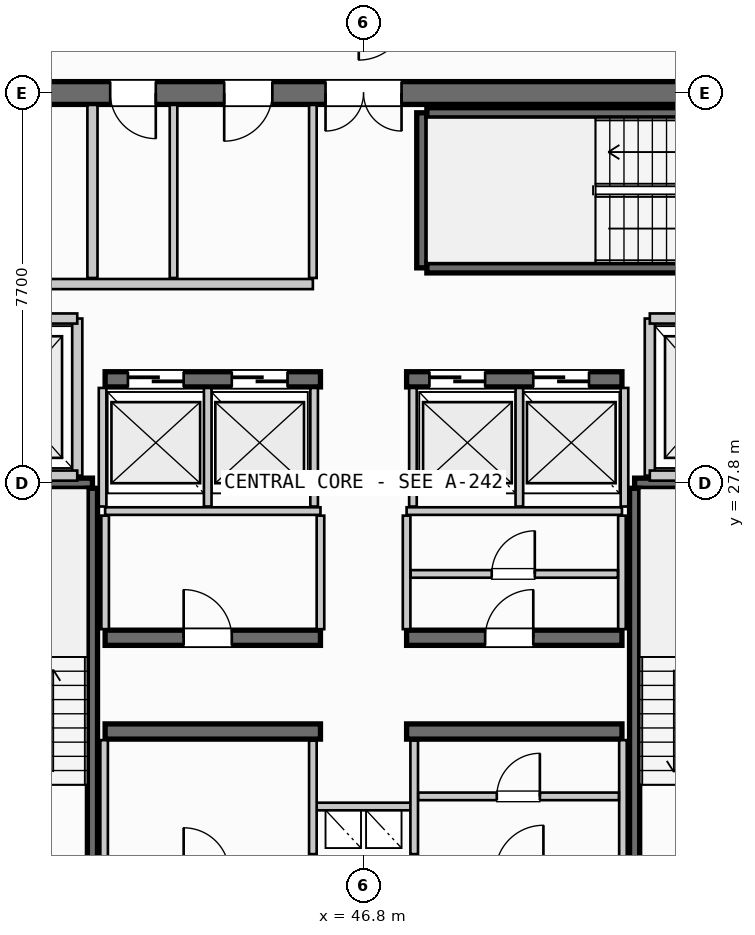
"""IFC4 building model, lengths in metres.
Left out: names, types, materials, properties, quantities, classifications, styles, units other than length and angle.
Written with IfcOpenShell. Run it as: python <this file> out.ifc"""

import sys

from ifc_helpers import new_model, si_unit, direction, frame, frame_2d, origin, place, context, subcontext, project, spatial, rectangle, extrude, source, transform, mapped, element, fill, save


model = new_model("IFC4")
c1 = context("Model", 3, precision=1e-05, world=origin(), true_north=direction((0.0, 1.0)))
c2 = subcontext(c1, "Body", "Model", "MODEL_VIEW")
j1 = project(units=[si_unit("LENGTHUNIT", "METRE"), si_unit("PLANEANGLEUNIT", "RADIAN")], contexts=[c1])
p1 = place(None, origin())
s1 = spatial("IfcSite", under=j1, at=p1, CompositionType="ELEMENT")
p2 = place(p1, origin())
s2 = spatial("IfcBuilding", under=s1, at=p2, CompositionType="ELEMENT")
p3 = place(p2, frame((0.0, 0.0, 300.85)))
s3 = spatial("IfcBuildingStorey", under=s2, at=p3, CompositionType="ELEMENT", Elevation=300.85)
p4 = place(p3, frame((55.6, 35.5, 0.0), z_axis=(0.0, 0.0, 1.0), x_axis=(-1.0, 0.0, 0.0)))
e1 = element("IfcWall", 1, at=p4, inside=s3, PredefinedType="SHEAR", context=c2, shape_type="SweptSolid", body=[
    extrude(rectangle(XDim=17.6, YDim=0.45, at=frame_2d((8.8, 0.0))), origin(), (0.0, 0.0, 1.0), 3.185),
])
p5 = place(p4, frame((8.05, 0.0, 0.0)))
e2 = element("IfcOpeningElement", 2, at=p5, cuts=e1, PredefinedType="OPENING", context=c2, shape_type="SweptSolid", body=[
    extrude(rectangle(XDim=1.5, YDim=2.2, at=frame_2d((0.75, 1.1))), frame((0.0, 0.235, 0.0), z_axis=(0.0, -1.0, 0.0), x_axis=(1.0, 0.0, 0.0)), (0.0, 0.0, 1.0), 0.47),
])
p6 = place(p4, frame((15.1, 0.0, 0.0)))
e3 = element("IfcOpeningElement", 3, at=p6, cuts=e1, PredefinedType="OPENING", context=c2, shape_type="SweptSolid", body=[
    extrude(rectangle(XDim=0.95, YDim=2.15, at=frame_2d((0.475, 1.075))), frame((0.0, 0.235, 0.0), z_axis=(0.0, -1.0, 0.0), x_axis=(1.0, 0.0, 0.0)), (0.0, 0.0, 1.0), 0.47),
])
p7 = place(p4, frame((12.9, 0.0, 0.0)))
e4 = element("IfcOpeningElement", 4, at=p7, cuts=e1, PredefinedType="OPENING", context=c2, shape_type="SweptSolid", body=[
    extrude(rectangle(XDim=0.9, YDim=2.15, at=frame_2d((0.45, 1.075))), frame((0.0, 0.235, 0.0), z_axis=(0.0, -1.0, 0.0), x_axis=(1.0, 0.0, 0.0)), (0.0, 0.0, 1.0), 0.47),
])
p8 = place(p4, frame((10.6, 0.0, 0.0)))
e5 = element("IfcOpeningElement", 5, at=p8, cuts=e1, PredefinedType="OPENING", context=c2, shape_type="SweptSolid", body=[
    extrude(rectangle(XDim=0.95, YDim=2.15, at=frame_2d((0.475, 1.075))), frame((0.0, 0.235, 0.0), z_axis=(0.0, -1.0, 0.0), x_axis=(1.0, 0.0, 0.0)), (0.0, 0.0, 1.0), 0.47),
])
for number, where, z_axis, x_axis in (
    (6, (41.7, 22.9, 0.0), (0.0, 0.0, 1.0), (1.0, 0.0, 0.0)),
    (7, (47.65, 22.9, 0.0), (0.0, 0.0, 1.0), (1.0, 0.0, 0.0)),
):
    element("IfcWall", number, at=place(p3, frame(where, z_axis=z_axis, x_axis=x_axis)), inside=s3, PredefinedType="SHEAR", context=c2, shape_type="SweptSolid", body=[
        extrude(rectangle(XDim=4.25, YDim=0.3, at=frame_2d((2.125, 0.0))), origin(), (0.0, 0.0, 1.0), 3.185),
    ])
p9 = place(p3, frame((41.7, 24.75, 0.0), z_axis=(0.0, 0.0, 1.0), x_axis=(1.0, 0.0, 0.0)))
e8 = element("IfcWall", 8, at=p9, inside=s3, PredefinedType="SHEAR", context=c2, shape_type="SweptSolid", body=[
    extrude(rectangle(XDim=4.25, YDim=0.3, at=frame_2d((2.125, 0.0))), origin(), (0.0, 0.0, 1.0), 3.185),
])
p10 = place(p9, frame((1.55, 0.0, 0.0)))
e9 = element("IfcOpeningElement", 9, at=p10, cuts=e8, PredefinedType="OPENING", context=c2, shape_type="SweptSolid", body=[
    extrude(rectangle(XDim=0.95, YDim=2.15, at=frame_2d((0.475, 1.075))), frame((0.0, 0.16, 0.0), z_axis=(0.0, -1.0, 0.0), x_axis=(1.0, 0.0, 0.0)), (0.0, 0.0, 1.0), 0.32),
])
p11 = place(p3, frame((47.65, 24.75, 0.0), z_axis=(0.0, 0.0, 1.0), x_axis=(1.0, 0.0, 0.0)))
e10 = element("IfcWall", 10, at=p11, inside=s3, PredefinedType="SHEAR", context=c2, shape_type="SweptSolid", body=[
    extrude(rectangle(XDim=4.25, YDim=0.3, at=frame_2d((2.125, 0.0))), origin(), (0.0, 0.0, 1.0), 3.185),
])
p12 = place(p11, frame((1.55, 0.0, 0.0)))
e11 = element("IfcOpeningElement", 11, at=p12, cuts=e10, PredefinedType="OPENING", context=c2, shape_type="SweptSolid", body=[
    extrude(rectangle(XDim=0.95, YDim=2.15, at=frame_2d((0.475, 1.075))), frame((0.0, 0.16, 0.0), z_axis=(0.0, -1.0, 0.0), x_axis=(1.0, 0.0, 0.0)), (0.0, 0.0, 1.0), 0.32),
])
p13 = place(p3, frame((41.7, 29.85, 0.0), z_axis=(0.0, 0.0, 1.0), x_axis=(1.0, 0.0, 0.0)))
e12 = element("IfcWall", 12, at=p13, inside=s3, PredefinedType="SHEAR", context=c2, shape_type="SweptSolid", body=[
    extrude(rectangle(XDim=4.25, YDim=0.3, at=frame_2d((2.125, 0.0))), origin(), (0.0, 0.0, 1.0), 3.185),
])
p14 = place(p13, frame((0.45, 0.0, 0.0)))
e13 = element("IfcOpeningElement", 13, at=p14, cuts=e12, PredefinedType="OPENING", context=c2, shape_type="SweptSolid", body=[
    extrude(rectangle(XDim=1.1, YDim=2.2, at=frame_2d((0.55, 1.1))), frame((0.0, 0.16, 0.0), z_axis=(0.0, -1.0, 0.0), x_axis=(1.0, 0.0, 0.0)), (0.0, 0.0, 1.0), 0.32),
])
p15 = place(p13, frame((2.5, 0.0, 0.0)))
e14 = element("IfcOpeningElement", 14, at=p15, cuts=e12, PredefinedType="OPENING", context=c2, shape_type="SweptSolid", body=[
    extrude(rectangle(XDim=1.1, YDim=2.2, at=frame_2d((0.55, 1.1))), frame((0.0, 0.16, 0.0), z_axis=(0.0, -1.0, 0.0), x_axis=(1.0, 0.0, 0.0)), (0.0, 0.0, 1.0), 0.32),
])
p16 = place(p3, frame((47.65, 29.85, 0.0), z_axis=(0.0, 0.0, 1.0), x_axis=(1.0, 0.0, 0.0)))
e15 = element("IfcWall", 15, at=p16, inside=s3, PredefinedType="SHEAR", context=c2, shape_type="SweptSolid", body=[
    extrude(rectangle(XDim=4.25, YDim=0.3, at=frame_2d((2.125, 0.0))), origin(), (0.0, 0.0, 1.0), 3.185),
])
p17 = place(p16, frame((0.45, 0.0, 0.0)))
e16 = element("IfcOpeningElement", 16, at=p17, cuts=e15, PredefinedType="OPENING", context=c2, shape_type="SweptSolid", body=[
    extrude(rectangle(XDim=1.1, YDim=2.2, at=frame_2d((0.55, 1.1))), frame((0.0, 0.16, 0.0), z_axis=(0.0, -1.0, 0.0), x_axis=(1.0, 0.0, 0.0)), (0.0, 0.0, 1.0), 0.32),
])
p18 = place(p16, frame((2.5, 0.0, 0.0)))
e17 = element("IfcOpeningElement", 17, at=p18, cuts=e15, PredefinedType="OPENING", context=c2, shape_type="SweptSolid", body=[
    extrude(rectangle(XDim=1.1, YDim=2.2, at=frame_2d((0.55, 1.1))), frame((0.0, 0.16, 0.0), z_axis=(0.0, -1.0, 0.0), x_axis=(1.0, 0.0, 0.0)), (0.0, 0.0, 1.0), 0.32),
])
p19 = place(p3, frame((38.39, 27.8, 0.0), z_axis=(0.0, 0.0, 1.0), x_axis=(1.0, 0.0, 0.0)))
e18 = element("IfcWall", 18, at=p19, inside=s3, PredefinedType="SHEAR", context=c2, shape_type="SweptSolid", body=[
    extrude(rectangle(XDim=3.06, YDim=0.2, at=frame_2d((1.53, 0.0))), origin(), (0.0, 0.0, 1.0), 3.185),
])
p20 = place(p3, frame((41.45, 27.7, 0.0), z_axis=(0.0, 0.0, 1.0), x_axis=(0.0, -1.0, 0.0)))
e19 = element("IfcWall", 19, at=p20, inside=s3, PredefinedType="SHEAR", context=c2, shape_type="SweptSolid", body=[
    extrude(rectangle(XDim=7.35, YDim=0.2, at=frame_2d((3.675, 0.0))), origin(), (0.0, 0.0, 1.0), 3.185),
])
p21 = place(p3, frame((52.15, 27.8, 0.0), z_axis=(0.0, 0.0, 1.0), x_axis=(1.0, 0.0, 0.0)))
e20 = element("IfcWall", 20, at=p21, inside=s3, PredefinedType="SHEAR", context=c2, shape_type="SweptSolid", body=[
    extrude(rectangle(XDim=3.06, YDim=0.2, at=frame_2d((1.53, 0.0))), origin(), (0.0, 0.0, 1.0), 3.185),
])
p22 = place(p3, frame((52.15, 20.35, 0.0), z_axis=(0.0, 0.0, 1.0), x_axis=(0.0, 1.0, 0.0)))
e21 = element("IfcWall", 21, at=p22, inside=s3, PredefinedType="SHEAR", context=c2, shape_type="SweptSolid", body=[
    extrude(rectangle(XDim=7.35, YDim=0.2, at=frame_2d((3.675, 0.0))), origin(), (0.0, 0.0, 1.0), 3.185),
])
p23 = place(p3, frame((47.95, 32.05, 0.0), z_axis=(0.0, 0.0, 1.0), x_axis=(0.0, 1.0, 0.0)))
e22 = element("IfcWall", 22, at=p23, inside=s3, PredefinedType="SHEAR", context=c2, shape_type="SweptSolid", body=[
    extrude(rectangle(XDim=3.06, YDim=0.2, at=frame_2d((1.53, 0.0))), origin(), (0.0, 0.0, 1.0), 3.185),
])
for number, where, z_axis, x_axis in (
    (23, (48.05, 35.11, 0.0), (0.0, 0.0, 1.0), (1.0, 0.0, 0.0)),
    (24, (55.4, 32.05, 0.0), (0.0, 0.0, 1.0), (-1.0, 0.0, 0.0)),
):
    element("IfcWall", number, at=place(p3, frame(where, z_axis=z_axis, x_axis=x_axis)), inside=s3, PredefinedType="SHEAR", context=c2, shape_type="SweptSolid", body=[
        extrude(rectangle(XDim=7.35, YDim=0.2, at=frame_2d((3.675, 0.0))), origin(), (0.0, 0.0, 1.0), 3.185),
    ])
p24 = place(p3, frame((45.8, 21.42, 0.0), z_axis=(0.0, 0.0, 1.0), x_axis=(1.0, 0.0, 0.0)))
e25 = element("IfcWall", 25, at=p24, inside=s3, PredefinedType="PARTITIONING", context=c2, shape_type="SweptSolid", body=[
    extrude(rectangle(XDim=2.0, YDim=0.15, at=frame_2d((1.0, 0.0))), origin(), (0.0, 0.0, 1.0), 2.28),
])
for number, where, z_axis, x_axis in (
    (26, (45.8, 20.48, 0.0), (0.0, 0.0, 1.0), (0.0, 1.0, 0.0)),
    (27, (47.8, 20.48, 0.0), (0.0, 0.0, 1.0), (0.0, 1.0, 0.0)),
):
    element("IfcWall", number, at=place(p3, frame(where, z_axis=z_axis, x_axis=x_axis)), inside=s3, PredefinedType="PARTITIONING", context=c2, shape_type="SweptSolid", body=[
        extrude(rectangle(XDim=2.24, YDim=0.15, at=frame_2d((1.12, 0.0))), origin(), (0.0, 0.0, 1.0), 2.28),
    ])
p25 = place(p3, frame((41.15, 27.95, 0.0), z_axis=(0.0, 0.0, 1.0), x_axis=(0.0, 1.0, 0.0)))
e28 = element("IfcWall", 28, at=p25, inside=s3, PredefinedType="PARTITIONING", context=c2, shape_type="SweptSolid", body=[
    extrude(rectangle(XDim=3.1, YDim=0.2, at=frame_2d((1.55, 0.0))), origin(), (0.0, 0.0, 1.0), 2.28),
])
for number, where, z_axis, x_axis in (
    (29, (38.235, 27.95, 0.0), (0.0, 0.0, 1.0), (1.0, 0.0, 0.0)),
    (30, (38.235, 31.05, 0.0), (0.0, 0.0, 1.0), (1.0, 0.0, 0.0)),
):
    element("IfcWall", number, at=place(p3, frame(where, z_axis=z_axis, x_axis=x_axis)), inside=s3, PredefinedType="PARTITIONING", context=c2, shape_type="SweptSolid", body=[
        extrude(rectangle(XDim=2.915, YDim=0.2, at=frame_2d((1.458, 0.0))), origin(), (0.0, 0.0, 1.0), 2.28),
    ])
p26 = place(p3, frame((52.45, 27.95, 0.0), z_axis=(0.0, 0.0, 1.0), x_axis=(0.0, 1.0, 0.0)))
e31 = element("IfcWall", 31, at=p26, inside=s3, PredefinedType="PARTITIONING", context=c2, shape_type="SweptSolid", body=[
    extrude(rectangle(XDim=3.1, YDim=0.2, at=frame_2d((1.55, 0.0))), origin(), (0.0, 0.0, 1.0), 2.28),
])
for number, where, z_axis, x_axis in (
    (32, (52.45, 27.95, 0.0), (0.0, 0.0, 1.0), (1.0, 0.0, 0.0)),
    (33, (52.45, 31.05, 0.0), (0.0, 0.0, 1.0), (1.0, 0.0, 0.0)),
):
    element("IfcWall", number, at=place(p3, frame(where, z_axis=z_axis, x_axis=x_axis)), inside=s3, PredefinedType="PARTITIONING", context=c2, shape_type="SweptSolid", body=[
        extrude(rectangle(XDim=2.915, YDim=0.2, at=frame_2d((1.458, 0.0))), origin(), (0.0, 0.0, 1.0), 2.28),
    ])
for number, where, z_axis, x_axis in (
    (34, (41.68, 20.335, 0.0), (0.0, 0.0, 1.0), (0.0, 1.0, 0.0)),
    (35, (51.92, 20.335, 0.0), (0.0, 0.0, 1.0), (0.0, 1.0, 0.0)),
):
    element("IfcWall", number, at=place(p3, frame(where, z_axis=z_axis, x_axis=x_axis)), inside=s3, PredefinedType="PARTITIONING", context=c2, shape_type="SweptSolid", body=[
        extrude(rectangle(XDim=2.395, YDim=0.15, at=frame_2d((1.198, 0.0))), origin(), (0.0, 0.0, 1.0), 2.28),
    ])
p27 = place(p3, frame((47.88, 21.62, 0.0), z_axis=(0.0, 0.0, 1.0), x_axis=(1.0, 0.0, 0.0)))
e36 = element("IfcWall", 36, at=p27, inside=s3, PredefinedType="PARTITIONING", context=c2, shape_type="SweptSolid", body=[
    extrude(rectangle(XDim=3.96, YDim=0.15, at=frame_2d((1.98, 0.0))), origin(), (0.0, 0.0, 1.0), 2.28),
])
p28 = place(p27, frame((1.55, 0.0, 0.0)))
e37 = element("IfcOpeningElement", 37, at=p28, cuts=e36, PredefinedType="OPENING", context=c2, shape_type="SweptSolid", body=[
    extrude(rectangle(XDim=0.85, YDim=2.15, at=frame_2d((0.425, 1.075))), frame((0.0, 0.085, 0.0), z_axis=(0.0, -1.0, 0.0), x_axis=(1.0, 0.0, 0.0)), (0.0, 0.0, 1.0), 0.17),
])
for number, where, z_axis, x_axis in (
    (38, (41.7, 27.25, 0.0), (0.0, 0.0, 1.0), (1.0, 0.0, 0.0)),
    (39, (47.65, 27.25, 0.0), (0.0, 0.0, 1.0), (1.0, 0.0, 0.0)),
):
    element("IfcWall", number, at=place(p3, frame(where, z_axis=z_axis, x_axis=x_axis)), inside=s3, PredefinedType="PARTITIONING", context=c2, shape_type="SweptSolid", body=[
        extrude(rectangle(XDim=4.25, YDim=0.15, at=frame_2d((2.125, 0.0))), origin(), (0.0, 0.0, 1.0), 2.28),
    ])
for number, where, z_axis, x_axis in (
    (40, (41.7, 24.92, 0.0), (0.0, 0.0, 1.0), (0.0, 1.0, 0.0)),
    (41, (45.95, 24.92, 0.0), (0.0, 0.0, 1.0), (0.0, 1.0, 0.0)),
    (42, (47.65, 24.92, 0.0), (0.0, 0.0, 1.0), (0.0, 1.0, 0.0)),
    (43, (51.9, 24.92, 0.0), (0.0, 0.0, 1.0), (0.0, 1.0, 0.0)),
):
    element("IfcWall", number, at=place(p3, frame(where, z_axis=z_axis, x_axis=x_axis)), inside=s3, PredefinedType="PARTITIONING", context=c2, shape_type="SweptSolid", body=[
        extrude(rectangle(XDim=2.24, YDim=0.15, at=frame_2d((1.12, 0.0))), origin(), (0.0, 0.0, 1.0), 2.28),
    ])
p29 = place(p3, frame((47.73, 26.01, 0.0), z_axis=(0.0, 0.0, 1.0), x_axis=(1.0, 0.0, 0.0)))
e44 = element("IfcWall", 44, at=p29, inside=s3, PredefinedType="PARTITIONING", context=c2, shape_type="SweptSolid", body=[
    extrude(rectangle(XDim=4.09, YDim=0.15, at=frame_2d((2.045, 0.0))), origin(), (0.0, 0.0, 1.0), 2.28),
])
p30 = place(p29, frame((1.6, 0.0, 0.0)))
e45 = element("IfcOpeningElement", 45, at=p30, cuts=e44, PredefinedType="OPENING", context=c2, shape_type="SweptSolid", body=[
    extrude(rectangle(XDim=0.85, YDim=2.15, at=frame_2d((0.425, 1.075))), frame((0.0, 0.085, 0.0), z_axis=(0.0, -1.0, 0.0), x_axis=(1.0, 0.0, 0.0)), (0.0, 0.0, 1.0), 0.17),
])
for number, where, z_axis, x_axis in (
    (46, (41.65, 27.34, 0.0), (0.0, 0.0, 1.0), (0.0, 1.0, 0.0)),
    (47, (43.725, 27.34, 0.0), (0.0, 0.0, 1.0), (0.0, 1.0, 0.0)),
    (48, (45.825, 27.34, 0.0), (0.0, 0.0, 1.0), (0.0, 1.0, 0.0)),
    (49, (47.775, 27.34, 0.0), (0.0, 0.0, 1.0), (0.0, 1.0, 0.0)),
    (50, (49.875, 27.34, 0.0), (0.0, 0.0, 1.0), (0.0, 1.0, 0.0)),
    (51, (51.95, 27.34, 0.0), (0.0, 0.0, 1.0), (0.0, 1.0, 0.0)),
):
    element("IfcWall", number, at=place(p3, frame(where, z_axis=z_axis, x_axis=x_axis)), inside=s3, PredefinedType="PARTITIONING", context=c2, shape_type="SweptSolid", body=[
        extrude(rectangle(XDim=2.34, YDim=0.15, at=frame_2d((1.17, 0.0))), origin(), (0.0, 0.0, 1.0), 2.28),
    ])
p31 = place(p3, frame((41.45, 31.85, 0.0), z_axis=(0.0, 0.0, 1.0), x_axis=(0.0, 1.0, 0.0)))
e52 = element("IfcWall", 52, at=p31, inside=s3, PredefinedType="PARTITIONING", context=c2, shape_type="SweptSolid", body=[
    extrude(rectangle(XDim=3.415, YDim=0.2, at=frame_2d((1.708, 0.0))), origin(), (0.0, 0.0, 1.0), 2.28),
])
p32 = place(p3, frame((38.235, 31.73, 0.0), z_axis=(0.0, 0.0, 1.0), x_axis=(1.0, 0.0, 0.0)))
e53 = element("IfcWall", 53, at=p32, inside=s3, PredefinedType="PARTITIONING", context=c2, shape_type="SweptSolid", body=[
    extrude(rectangle(XDim=7.565, YDim=0.2, at=frame_2d((3.782, 0.0))), origin(), (0.0, 0.0, 1.0), 2.28),
])
p33 = place(p3, frame((45.8, 31.85, 0.0), z_axis=(0.0, 0.0, 1.0), x_axis=(0.0, 1.0, 0.0)))
e54 = element("IfcWall", 54, at=p33, inside=s3, PredefinedType="PARTITIONING", context=c2, shape_type="SweptSolid", body=[
    extrude(rectangle(XDim=3.415, YDim=0.15, at=frame_2d((1.708, 0.0))), origin(), (0.0, 0.0, 1.0), 2.28),
])
p34 = place(p3, frame((43.05, 31.85, 0.0), z_axis=(0.0, 0.0, 1.0), x_axis=(0.0, 1.0, 0.0)))
e55 = element("IfcWall", 55, at=p34, inside=s3, PredefinedType="PLUMBINGWALL", context=c2, shape_type="SweptSolid", body=[
    extrude(rectangle(XDim=3.415, YDim=0.15, at=frame_2d((1.708, 0.0))), origin(), (0.0, 0.0, 1.0), 2.28),
])
m1 = source(origin(), c2, "Body", "SweptSolid", [
    extrude(rectangle(XDim=1.5, YDim=2.2, at=frame_2d((0.75, 1.1))), frame((0.0, 0.025, 0.0), z_axis=(0.0, -1.0, 0.0), x_axis=(1.0, 0.0, 0.0)), (0.0, 0.0, 1.0), 0.05),
])
p35 = place(p5, origin())
e56 = element("IfcDoor", 56, at=p35, inside=s3, OperationType="DOUBLE_DOOR_SINGLE_SWING", PredefinedType="DOOR", context=c2, shape_type="MappedRepresentation", body=[
    mapped(m1, transform((0.0, 0.0, 0.0), scale=1.0)),
])
fill(e2, e56)
m2 = source(origin(), c2, "Body", "SweptSolid", [
    extrude(rectangle(XDim=0.95, YDim=2.15, at=frame_2d((0.475, 1.075))), frame((0.0, 0.025, 0.0), z_axis=(0.0, -1.0, 0.0), x_axis=(1.0, 0.0, 0.0)), (0.0, 0.0, 1.0), 0.05),
])
p36 = place(p10, origin())
e57 = element("IfcDoor", 57, at=p36, inside=s3, OperationType="SINGLE_SWING_LEFT", PredefinedType="DOOR", context=c2, shape_type="MappedRepresentation", body=[
    mapped(m2, transform((0.0, 0.0, 0.0), scale=1.0)),
])
fill(e9, e57)
p37 = place(p12, origin())
e58 = element("IfcDoor", 58, at=p37, inside=s3, OperationType="SINGLE_SWING_RIGHT", PredefinedType="DOOR", context=c2, shape_type="MappedRepresentation", body=[
    mapped(m2, transform((0.0, 0.0, 0.0), scale=1.0)),
])
fill(e11, e58)
m3 = source(origin(), c2, "Body", "SweptSolid", [
    extrude(rectangle(XDim=1.1, YDim=2.2, at=frame_2d((0.55, 1.1))), frame((0.0, 0.025, 0.0), z_axis=(0.0, -1.0, 0.0), x_axis=(1.0, 0.0, 0.0)), (0.0, 0.0, 1.0), 0.05),
])
p38 = place(p14, origin())
e59 = element("IfcDoor", 59, at=p38, inside=s3, OperationType="SLIDING_TO_LEFT", PredefinedType="DOOR", context=c2, shape_type="MappedRepresentation", body=[
    mapped(m3, transform((0.0, 0.0, 0.0), scale=1.0)),
])
fill(e13, e59)
p39 = place(p15, origin())
e60 = element("IfcDoor", 60, at=p39, inside=s3, OperationType="SLIDING_TO_LEFT", PredefinedType="DOOR", context=c2, shape_type="MappedRepresentation", body=[
    mapped(m3, transform((0.0, 0.0, 0.0), scale=1.0)),
])
fill(e14, e60)
p40 = place(p17, origin())
e61 = element("IfcDoor", 61, at=p40, inside=s3, OperationType="SLIDING_TO_LEFT", PredefinedType="DOOR", context=c2, shape_type="MappedRepresentation", body=[
    mapped(m3, transform((0.0, 0.0, 0.0), scale=1.0)),
])
fill(e16, e61)
p41 = place(p18, origin())
e62 = element("IfcDoor", 62, at=p41, inside=s3, OperationType="SLIDING_TO_LEFT", PredefinedType="DOOR", context=c2, shape_type="MappedRepresentation", body=[
    mapped(m3, transform((0.0, 0.0, 0.0), scale=1.0)),
])
fill(e17, e62)
m4 = source(origin(), c2, "Body", "SweptSolid", [
    extrude(rectangle(XDim=0.9, YDim=2.15, at=frame_2d((0.45, 1.075))), frame((0.0, 0.025, 0.0), z_axis=(0.0, -1.0, 0.0), x_axis=(1.0, 0.0, 0.0)), (0.0, 0.0, 1.0), 0.05),
])
p42 = place(p7, origin())
e63 = element("IfcDoor", 63, at=p42, inside=s3, OperationType="SINGLE_SWING_LEFT", PredefinedType="DOOR", context=c2, shape_type="MappedRepresentation", body=[
    mapped(m4, transform((0.0, 0.0, 0.0), scale=1.0)),
])
fill(e4, e63)
p43 = place(p8, origin())
e64 = element("IfcDoor", 64, at=p43, inside=s3, OperationType="SINGLE_SWING_RIGHT", PredefinedType="DOOR", context=c2, shape_type="MappedRepresentation", body=[
    mapped(m2, transform((0.0, 0.0, 0.0), scale=1.0)),
])
fill(e5, e64)
m5 = source(origin(), c2, "Body", "SweptSolid", [
    extrude(rectangle(XDim=0.85, YDim=2.15, at=frame_2d((0.425, 1.075))), frame((0.0, 0.025, 0.0), z_axis=(0.0, -1.0, 0.0), x_axis=(1.0, 0.0, 0.0)), (0.0, 0.0, 1.0), 0.05),
])
p44 = place(p28, origin())
e65 = element("IfcDoor", 65, at=p44, inside=s3, OperationType="SINGLE_SWING_RIGHT", PredefinedType="DOOR", context=c2, shape_type="MappedRepresentation", body=[
    mapped(m5, transform((0.0, 0.0, 0.0), scale=1.0)),
])
fill(e37, e65)
p45 = place(p30, origin())
e66 = element("IfcDoor", 66, at=p45, inside=s3, OperationType="SINGLE_SWING_RIGHT", PredefinedType="DOOR", context=c2, shape_type="MappedRepresentation", body=[
    mapped(m5, transform((0.0, 0.0, 0.0), scale=1.0)),
])
fill(e45, e66)
save(model, sys.argv[1])
